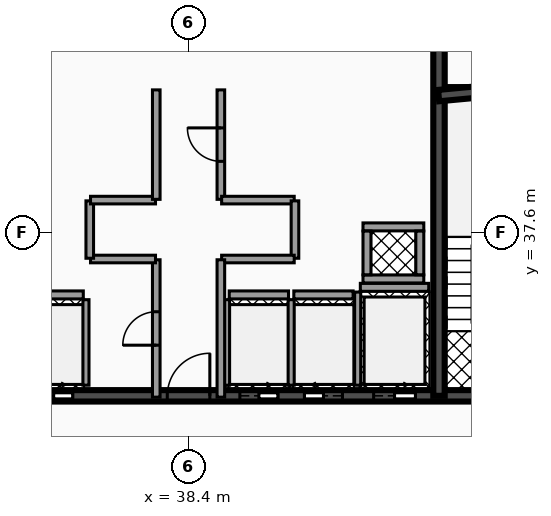
"""IFC4 building model, lengths in metres.
Left out: names, types, materials, properties, quantities, classifications, styles, units other than length and angle.
Written with IfcOpenShell. Run it as: python <this file> out.ifc"""

import sys

from ifc_helpers import new_model, si_unit, direction, frame, frame_2d, origin, place, context, subcontext, project, spatial, rectangle, extrude, element, fill, save


model = new_model("IFC4")
c1 = context("Model", 3, precision=1e-05, world=origin(), true_north=direction((0.0, 1.0)))
c2 = subcontext(c1, "Body", "Model", "MODEL_VIEW")
j1 = project(units=[si_unit("LENGTHUNIT", "METRE"), si_unit("PLANEANGLEUNIT", "RADIAN")], contexts=[c1])
p1 = place(None, origin())
s1 = spatial("IfcSite", under=j1, at=p1, CompositionType="ELEMENT")
p2 = place(p1, origin())
s2 = spatial("IfcBuilding", under=s1, at=p2, CompositionType="ELEMENT")
p3 = place(p2, frame((0.0, 0.0, 268.6)))
s3 = spatial("IfcBuildingStorey", under=s2, at=p3, CompositionType="ELEMENT", Elevation=268.6)
p4 = place(p3, frame((28.5, 33.3, 0.0), z_axis=(0.0, 0.0, 1.0), x_axis=(1.0, 0.0, 0.0)))
e1 = element("IfcWall", 1, at=p4, inside=s3, PredefinedType="SHEAR", context=c2, shape_type="SweptSolid", body=[
    extrude(rectangle(XDim=19.86, YDim=0.3, at=frame_2d((9.93, 0.0))), origin(), (0.0, 0.0, 1.0), 3.18),
])
p5 = place(p4, frame((3.93, 0.0, 0.0)))
e2 = element("IfcOpeningElement", 2, at=p5, cuts=e1, PredefinedType="OPENING", context=c2, shape_type="SweptSolid", body=[
    extrude(rectangle(XDim=1.1, YDim=2.15, at=frame_2d((0.55, 1.075))), frame((0.0, 0.16, 0.0), z_axis=(0.0, -1.0, 0.0), x_axis=(1.0, 0.0, 0.0)), (0.0, 0.0, 1.0), 0.32),
])
p6 = place(p4, frame((14.77, 0.0, 0.0)))
e3 = element("IfcOpeningElement", 3, at=p6, cuts=e1, PredefinedType="OPENING", context=c2, shape_type="SweptSolid", body=[
    extrude(rectangle(XDim=1.1, YDim=2.15, at=frame_2d((0.55, 1.075))), frame((0.0, 0.16, 0.0), z_axis=(0.0, -1.0, 0.0), x_axis=(1.0, 0.0, 0.0)), (0.0, 0.0, 1.0), 0.32),
])
p7 = place(p4, frame((11.25, 0.0, 0.0)))
e4 = element("IfcOpeningElement", 4, at=p7, cuts=e1, PredefinedType="OPENING", context=c2, shape_type="SweptSolid", body=[
    extrude(rectangle(XDim=1.0, YDim=2.1, at=frame_2d((0.5, 1.05))), frame((0.0, 0.16, 0.0), z_axis=(0.0, -1.0, 0.0), x_axis=(1.0, 0.0, 0.0)), (0.0, 0.0, 1.0), 0.32),
])
p8 = place(p4, frame((12.95, 0.0, 0.0)))
e5 = element("IfcOpeningElement", 5, at=p8, cuts=e1, PredefinedType="OPENING", context=c2, shape_type="SweptSolid", body=[
    extrude(rectangle(XDim=1.0, YDim=2.1, at=frame_2d((0.5, 1.05))), frame((0.0, 0.16, 0.0), z_axis=(0.0, -1.0, 0.0), x_axis=(1.0, 0.0, 0.0)), (0.0, 0.0, 1.0), 0.32),
])
p9 = place(p4, frame((5.85, 0.0, 0.0)))
e6 = element("IfcOpeningElement", 6, at=p9, cuts=e1, PredefinedType="OPENING", context=c2, shape_type="SweptSolid", body=[
    extrude(rectangle(XDim=1.0, YDim=2.1, at=frame_2d((0.5, 1.05))), frame((0.0, 0.16, 0.0), z_axis=(0.0, -1.0, 0.0), x_axis=(1.0, 0.0, 0.0)), (0.0, 0.0, 1.0), 0.32),
])
p10 = place(p4, frame((1.21, 0.0, 0.0)))
e7 = element("IfcOpeningElement", 7, at=p10, cuts=e1, PredefinedType="OPENING", context=c2, shape_type="SweptSolid", body=[
    extrude(rectangle(XDim=1.1, YDim=2.2, at=frame_2d((0.55, 1.1))), frame((0.0, 0.16, 0.0), z_axis=(0.0, -1.0, 0.0), x_axis=(1.0, 0.0, 0.0)), (0.0, 0.0, 1.0), 0.32),
])
p11 = place(p4, frame((9.34, 0.0, 0.0)))
e8 = element("IfcOpeningElement", 8, at=p11, cuts=e1, PredefinedType="OPENING", context=c2, shape_type="SweptSolid", body=[
    extrude(rectangle(XDim=1.12, YDim=2.05, at=frame_2d((0.56, 1.025))), frame((0.0, 0.16, 0.0), z_axis=(0.0, -1.0, 0.0), x_axis=(1.0, 0.0, 0.0)), (0.0, 0.0, 1.0), 0.32),
])
p12 = place(p4, frame((17.55, 0.0, 0.0)))
e9 = element("IfcOpeningElement", 9, at=p12, cuts=e1, PredefinedType="OPENING", context=c2, shape_type="SweptSolid", body=[
    extrude(rectangle(XDim=1.1, YDim=2.2, at=frame_2d((0.55, 1.1))), frame((0.0, 0.16, 0.0), z_axis=(0.0, -1.0, 0.0), x_axis=(1.0, 0.0, 0.0)), (0.0, 0.0, 1.0), 0.32),
])
p13 = place(p3, frame((44.99, 33.3, 0.0), z_axis=(0.0, 0.0, 1.0), x_axis=(0.0, 1.0, 0.0)))
e10 = element("IfcWall", 10, at=p13, inside=s3, PredefinedType="SHEAR", context=c2, shape_type="SweptSolid", body=[
    extrude(rectangle(XDim=10.1, YDim=0.3, at=frame_2d((5.05, 0.0))), origin(), (0.0, 0.0, 1.0), 3.18),
])
p14 = place(p3, frame((44.98, 41.2, 0.0), z_axis=(0.0, 0.0, 1.0), x_axis=(0.995686468965, 0.09278176286, 0.0)))
e11 = element("IfcWall", 11, at=p14, inside=s3, PredefinedType="SHEAR", context=c2, shape_type="SweptSolid", body=[
    extrude(rectangle(XDim=3.234, YDim=0.3, at=frame_2d((1.617, 0.0))), origin(), (0.0, 0.0, 1.0), 3.18),
])
p15 = place(p3, frame((42.92, 36.155, 0.0), z_axis=(0.0, 0.0, 1.0), x_axis=(1.0, 0.0, 0.0)))
e12 = element("IfcWall", 12, at=p15, inside=s3, PredefinedType="SOLIDWALL", context=c2, shape_type="SweptSolid", body=[
    extrude(rectangle(XDim=1.8, YDim=0.21, at=frame_2d((0.9, 0.0))), origin(), (0.0, 0.0, 1.0), 3.18),
])
p16 = place(p3, frame((42.85, 33.58, 0.0), z_axis=(0.0, 0.0, 1.0), x_axis=(0.0, 1.0, 0.0)))
e13 = element("IfcWall", 13, at=p16, inside=s3, PredefinedType="SOLIDWALL", context=c2, shape_type="SweptSolid", body=[
    extrude(rectangle(XDim=2.45, YDim=0.16, at=frame_2d((1.225, 0.0))), origin(), (0.0, 0.0, 1.0), 3.18),
])
p17 = place(p3, frame((39.47, 35.955, 0.0), z_axis=(0.0, 0.0, 1.0), x_axis=(1.0, 0.0, 0.0)))
e14 = element("IfcWall", 14, at=p17, inside=s3, PredefinedType="SOLIDWALL", context=c2, shape_type="SweptSolid", body=[
    extrude(rectangle(XDim=1.56, YDim=0.21, at=frame_2d((0.78, 0.0))), origin(), (0.0, 0.0, 1.0), 3.18),
])
for number, where, z_axis, x_axis in (
    (15, (39.4, 33.58, 0.0), (0.0, 0.0, 1.0), (0.0, 1.0, 0.0)),
    (16, (41.1, 33.58, 0.0), (0.0, 0.0, 1.0), (0.0, 1.0, 0.0)),
):
    element("IfcWall", number, at=place(p3, frame(where, z_axis=z_axis, x_axis=x_axis)), inside=s3, PredefinedType="SOLIDWALL", context=c2, shape_type="SweptSolid", body=[
        extrude(rectangle(XDim=2.25, YDim=0.16, at=frame_2d((1.125, 0.0))), origin(), (0.0, 0.0, 1.0), 3.18),
    ])
p18 = place(p3, frame((41.17, 35.955, 0.0), z_axis=(0.0, 0.0, 1.0), x_axis=(1.0, 0.0, 0.0)))
e17 = element("IfcWall", 17, at=p18, inside=s3, PredefinedType="SOLIDWALL", context=c2, shape_type="SweptSolid", body=[
    extrude(rectangle(XDim=1.56, YDim=0.21, at=frame_2d((0.78, 0.0))), origin(), (0.0, 0.0, 1.0), 3.18),
])
p19 = place(p3, frame((34.07, 35.955, 0.0), z_axis=(0.0, 0.0, 1.0), x_axis=(1.0, 0.0, 0.0)))
e18 = element("IfcWall", 18, at=p19, inside=s3, PredefinedType="SOLIDWALL", context=c2, shape_type="SweptSolid", body=[
    extrude(rectangle(XDim=1.56, YDim=0.21, at=frame_2d((0.78, 0.0))), origin(), (0.0, 0.0, 1.0), 3.18),
])
p20 = place(p3, frame((35.7, 33.58, 0.0), z_axis=(0.0, 0.0, 1.0), x_axis=(0.0, 1.0, 0.0)))
e19 = element("IfcWall", 19, at=p20, inside=s3, PredefinedType="SOLIDWALL", context=c2, shape_type="SweptSolid", body=[
    extrude(rectangle(XDim=2.25, YDim=0.16, at=frame_2d((1.125, 0.0))), origin(), (0.0, 0.0, 1.0), 3.18),
])
for number, where, z_axis, x_axis in (
    (20, (42.99, 36.375, 0.0), (0.0, 0.0, 1.0), (1.0, 0.0, 0.0)),
    (21, (42.99, 37.745, 0.0), (0.0, 0.0, 1.0), (1.0, 0.0, 0.0)),
):
    element("IfcWall", number, at=place(p3, frame(where, z_axis=z_axis, x_axis=x_axis)), inside=s3, PredefinedType="SOLIDWALL", context=c2, shape_type="SweptSolid", body=[
        extrude(rectangle(XDim=1.6, YDim=0.21, at=frame_2d((0.8, 0.0))), origin(), (0.0, 0.0, 1.0), 3.18),
    ])
for number, where, z_axis, x_axis in (
    (22, (43.095, 36.485, 0.0), (0.0, 0.0, 1.0), (0.0, 1.0, 0.0)),
    (23, (44.485, 36.485, 0.0), (0.0, 0.0, 1.0), (0.0, 1.0, 0.0)),
):
    element("IfcWall", number, at=place(p3, frame(where, z_axis=z_axis, x_axis=x_axis)), inside=s3, PredefinedType="SOLIDWALL", context=c2, shape_type="SweptSolid", body=[
        extrude(rectangle(XDim=1.15, YDim=0.21, at=frame_2d((0.575, 0.0))), origin(), (0.0, 0.0, 1.0), 3.18),
    ])
p21 = place(p3, frame((37.55, 33.265, 0.0), z_axis=(0.0, 0.0, 1.0), x_axis=(0.0, 1.0, 0.0)))
e24 = element("IfcWall", 24, at=p21, inside=s3, PredefinedType="PARTITIONING", context=c2, shape_type="SweptSolid", body=[
    extrude(rectangle(XDim=3.615, YDim=0.2, at=frame_2d((1.808, 0.0))), origin(), (0.0, 0.0, 1.0), 2.235),
])
p22 = place(p21, frame((1.367, 0.0, 0.0)))
e25 = element("IfcOpeningElement", 25, at=p22, cuts=e24, PredefinedType="OPENING", context=c2, shape_type="SweptSolid", body=[
    extrude(rectangle(XDim=0.88, YDim=2.05, at=frame_2d((0.44, 1.025))), frame((0.0, 0.11, 0.0), z_axis=(0.0, -1.0, 0.0), x_axis=(1.0, 0.0, 0.0)), (0.0, 0.0, 1.0), 0.22),
])
p23 = place(p3, frame((35.82, 36.9, 0.0), z_axis=(0.0, 0.0, 1.0), x_axis=(1.0, 0.0, 0.0)))
e26 = element("IfcWall", 26, at=p23, inside=s3, PredefinedType="PARTITIONING", context=c2, shape_type="SweptSolid", body=[
    extrude(rectangle(XDim=1.71, YDim=0.2, at=frame_2d((0.855, 0.0))), origin(), (0.0, 0.0, 1.0), 2.235),
])
p24 = place(p3, frame((35.8, 36.92, 0.0), z_axis=(0.0, 0.0, 1.0), x_axis=(0.0, 1.0, 0.0)))
e27 = element("IfcWall", 27, at=p24, inside=s3, PredefinedType="PARTITIONING", context=c2, shape_type="SweptSolid", body=[
    extrude(rectangle(XDim=1.51, YDim=0.2, at=frame_2d((0.755, 0.0))), origin(), (0.0, 0.0, 1.0), 2.235),
])
p25 = place(p3, frame((35.82, 38.45, 0.0), z_axis=(0.0, 0.0, 1.0), x_axis=(1.0, 0.0, 0.0)))
e28 = element("IfcWall", 28, at=p25, inside=s3, PredefinedType="PARTITIONING", context=c2, shape_type="SweptSolid", body=[
    extrude(rectangle(XDim=1.71, YDim=0.2, at=frame_2d((0.855, 0.0))), origin(), (0.0, 0.0, 1.0), 2.235),
])
p26 = place(p3, frame((37.55, 38.47, 0.0), z_axis=(0.0, 0.0, 1.0), x_axis=(0.0, 1.0, 0.0)))
e29 = element("IfcWall", 29, at=p26, inside=s3, PredefinedType="PARTITIONING", context=c2, shape_type="SweptSolid", body=[
    extrude(rectangle(XDim=2.88, YDim=0.2, at=frame_2d((1.44, 0.0))), origin(), (0.0, 0.0, 1.0), 2.235),
])
p27 = place(p3, frame((39.25, 38.47, 0.0), z_axis=(0.0, 0.0, 1.0), x_axis=(0.0, 1.0, 0.0)))
e30 = element("IfcWall", 30, at=p27, inside=s3, PredefinedType="PARTITIONING", context=c2, shape_type="SweptSolid", body=[
    extrude(rectangle(XDim=2.88, YDim=0.2, at=frame_2d((1.44, 0.0))), origin(), (0.0, 0.0, 1.0), 2.235),
])
p28 = place(p27, frame((1.0, 0.0, 0.0)))
e31 = element("IfcOpeningElement", 31, at=p28, cuts=e30, PredefinedType="OPENING", context=c2, shape_type="SweptSolid", body=[
    extrude(rectangle(XDim=0.88, YDim=2.05, at=frame_2d((0.44, 1.025))), frame((0.0, 0.11, 0.0), z_axis=(0.0, -1.0, 0.0), x_axis=(1.0, 0.0, 0.0)), (0.0, 0.0, 1.0), 0.22),
])
p29 = place(p3, frame((39.27, 38.45, 0.0), z_axis=(0.0, 0.0, 1.0), x_axis=(1.0, 0.0, 0.0)))
e32 = element("IfcWall", 32, at=p29, inside=s3, PredefinedType="PARTITIONING", context=c2, shape_type="SweptSolid", body=[
    extrude(rectangle(XDim=1.91, YDim=0.2, at=frame_2d((0.955, 0.0))), origin(), (0.0, 0.0, 1.0), 2.235),
])
p30 = place(p3, frame((41.2, 36.92, 0.0), z_axis=(0.0, 0.0, 1.0), x_axis=(0.0, 1.0, 0.0)))
e33 = element("IfcWall", 33, at=p30, inside=s3, PredefinedType="PARTITIONING", context=c2, shape_type="SweptSolid", body=[
    extrude(rectangle(XDim=1.51, YDim=0.2, at=frame_2d((0.755, 0.0))), origin(), (0.0, 0.0, 1.0), 2.235),
])
p31 = place(p3, frame((39.27, 36.9, 0.0), z_axis=(0.0, 0.0, 1.0), x_axis=(1.0, 0.0, 0.0)))
e34 = element("IfcWall", 34, at=p31, inside=s3, PredefinedType="PARTITIONING", context=c2, shape_type="SweptSolid", body=[
    extrude(rectangle(XDim=1.91, YDim=0.2, at=frame_2d((0.955, 0.0))), origin(), (0.0, 0.0, 1.0), 2.235),
])
p32 = place(p3, frame((39.25, 33.265, 0.0), z_axis=(0.0, 0.0, 1.0), x_axis=(0.0, 1.0, 0.0)))
e35 = element("IfcWall", 35, at=p32, inside=s3, PredefinedType="PARTITIONING", context=c2, shape_type="SweptSolid", body=[
    extrude(rectangle(XDim=3.615, YDim=0.2, at=frame_2d((1.808, 0.0))), origin(), (0.0, 0.0, 1.0), 2.235),
])
p33 = place(p6, origin())
e36 = element("IfcDoor", 36, at=p33, inside=s3, OperationType="SLIDING_TO_RIGHT", PredefinedType="DOOR", context=c2, shape_type="SweptSolid", body=[
    extrude(rectangle(XDim=1.1, YDim=2.15, at=frame_2d((0.55, 1.075))), frame((0.0, 0.025, 0.0), z_axis=(0.0, -1.0, 0.0), x_axis=(1.0, 0.0, 0.0)), (0.0, 0.0, 1.0), 0.05),
])
fill(e3, e36)
p34 = place(p7, origin())
e37 = element("IfcDoor", 37, at=p34, inside=s3, OperationType="SLIDING_TO_RIGHT", PredefinedType="DOOR", context=c2, shape_type="SweptSolid", body=[
    extrude(rectangle(XDim=1.0, YDim=2.1, at=frame_2d((0.5, 1.05))), frame((0.0, 0.025, 0.0), z_axis=(0.0, -1.0, 0.0), x_axis=(1.0, 0.0, 0.0)), (0.0, 0.0, 1.0), 0.05),
])
fill(e4, e37)
p35 = place(p8, origin())
e38 = element("IfcDoor", 38, at=p35, inside=s3, OperationType="SLIDING_TO_LEFT", PredefinedType="DOOR", context=c2, shape_type="SweptSolid", body=[
    extrude(rectangle(XDim=1.0, YDim=2.1, at=frame_2d((0.5, 1.05))), frame((0.0, 0.025, 0.0), z_axis=(0.0, -1.0, 0.0), x_axis=(1.0, 0.0, 0.0)), (0.0, 0.0, 1.0), 0.05),
])
fill(e5, e38)
p36 = place(p9, origin())
e39 = element("IfcDoor", 39, at=p36, inside=s3, OperationType="SLIDING_TO_RIGHT", PredefinedType="DOOR", context=c2, shape_type="SweptSolid", body=[
    extrude(rectangle(XDim=1.0, YDim=2.1, at=frame_2d((0.5, 1.05))), frame((0.0, 0.025, 0.0), z_axis=(0.0, -1.0, 0.0), x_axis=(1.0, 0.0, 0.0)), (0.0, 0.0, 1.0), 0.05),
])
fill(e6, e39)
p37 = place(p11, origin())
e40 = element("IfcDoor", 40, at=p37, inside=s3, OperationType="SINGLE_SWING_RIGHT", PredefinedType="DOOR", context=c2, shape_type="SweptSolid", body=[
    extrude(rectangle(XDim=1.12, YDim=2.05, at=frame_2d((0.56, 1.025))), frame((0.0, 0.025, 0.0), z_axis=(0.0, -1.0, 0.0), x_axis=(1.0, 0.0, 0.0)), (0.0, 0.0, 1.0), 0.05),
])
fill(e8, e40)
p38 = place(p22, origin())
e41 = element("IfcDoor", 41, at=p38, inside=s3, OperationType="SINGLE_SWING_LEFT", PredefinedType="DOOR", context=c2, shape_type="SweptSolid", body=[
    extrude(rectangle(XDim=0.88, YDim=2.05, at=frame_2d((0.44, 1.025))), frame((0.0, 0.025, 0.0), z_axis=(0.0, -1.0, 0.0), x_axis=(1.0, 0.0, 0.0)), (0.0, 0.0, 1.0), 0.05),
])
fill(e25, e41)
p39 = place(p28, origin())
e42 = element("IfcDoor", 42, at=p39, inside=s3, OperationType="SINGLE_SWING_RIGHT", PredefinedType="DOOR", context=c2, shape_type="SweptSolid", body=[
    extrude(rectangle(XDim=0.88, YDim=2.05, at=frame_2d((0.44, 1.025))), frame((0.0, 0.025, 0.0), z_axis=(0.0, -1.0, 0.0), x_axis=(1.0, 0.0, 0.0)), (0.0, 0.0, 1.0), 0.05),
])
fill(e31, e42)
save(model, sys.argv[1])
